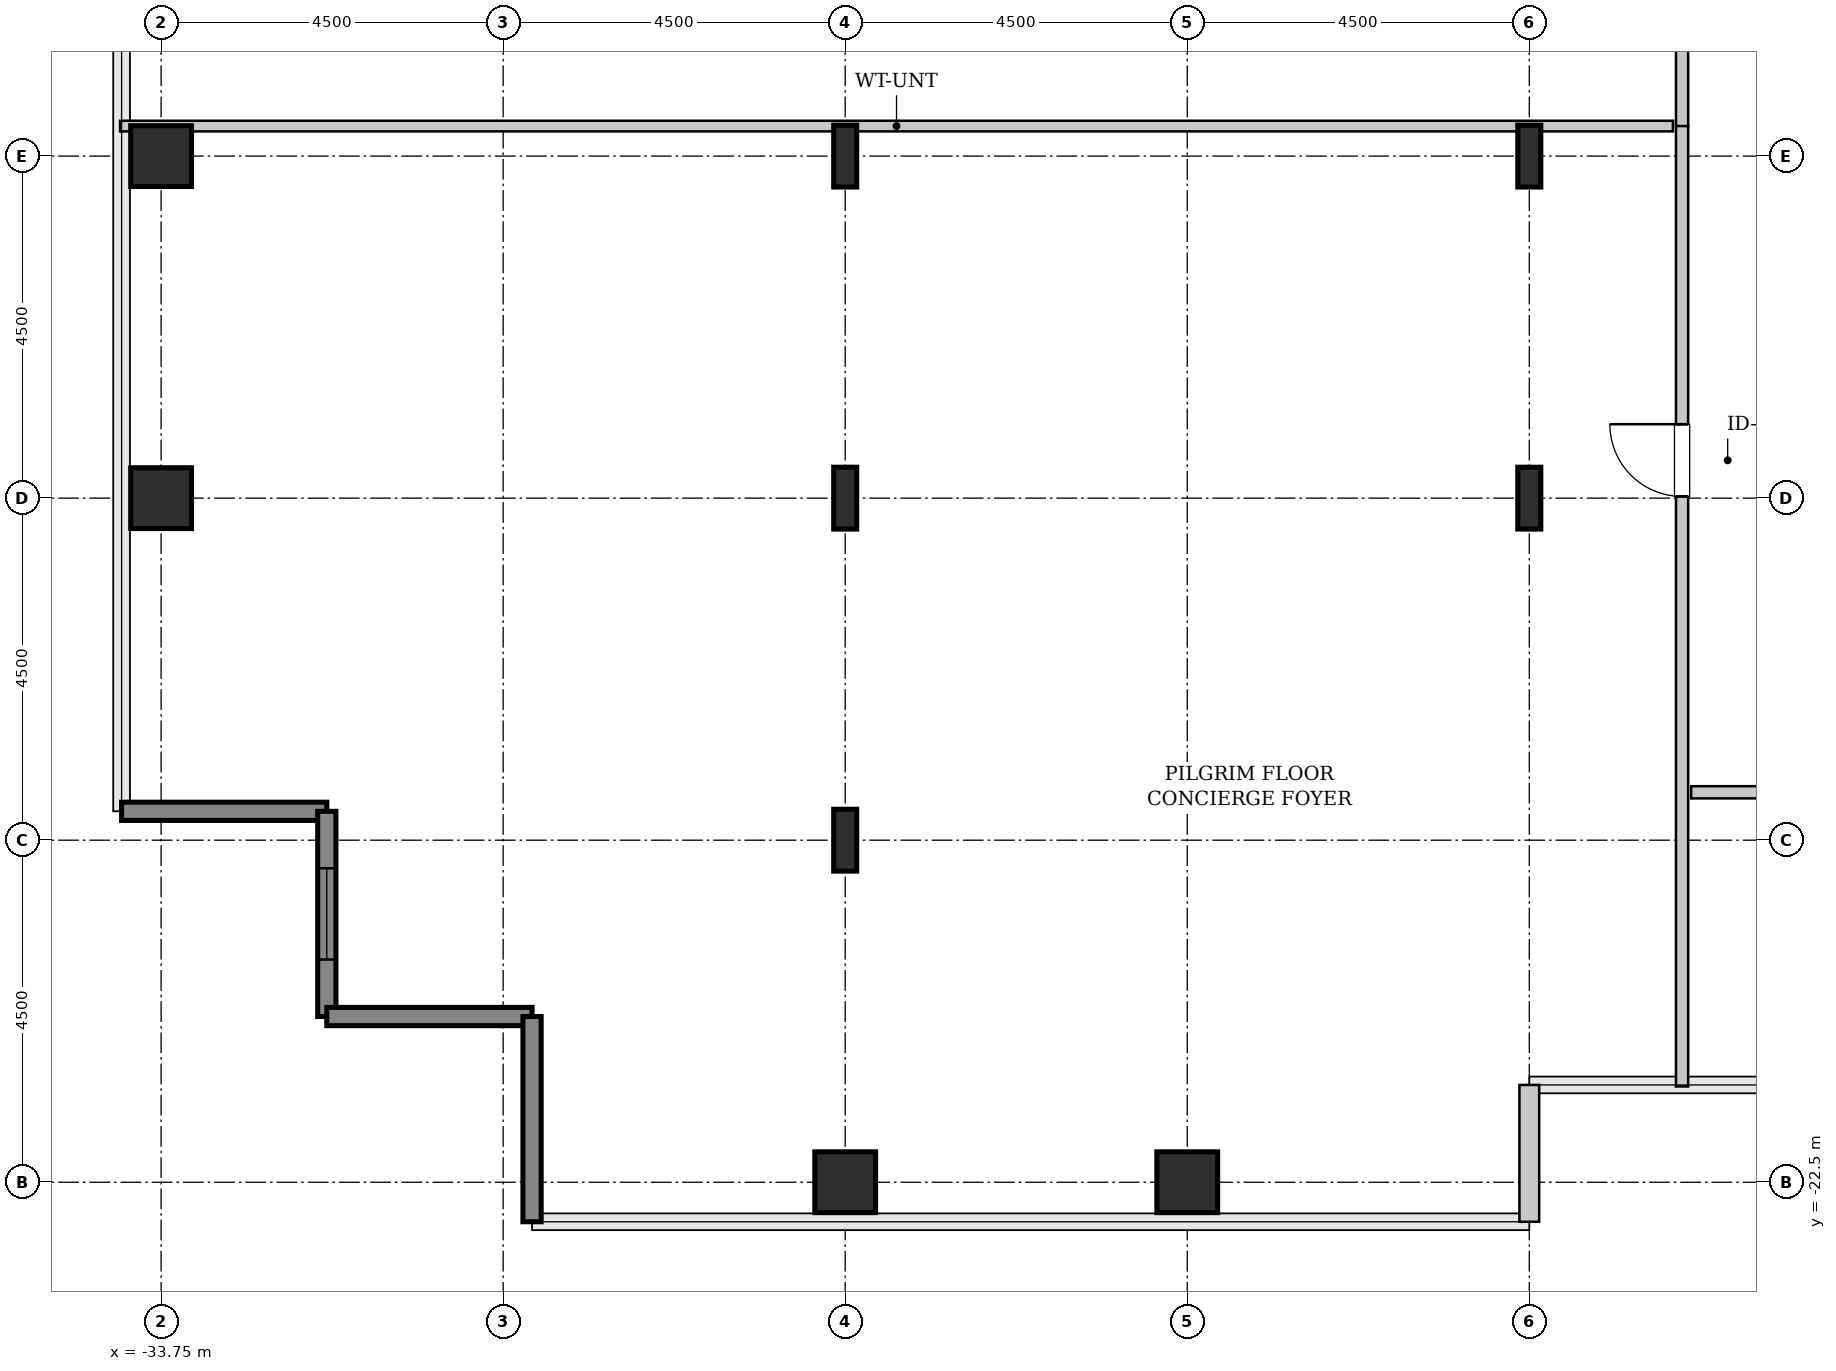
"""IFC4 building model, lengths in metres.
Left out: names, types, materials, properties, quantities, classifications, styles, units other than length and angle.
Written with IfcOpenShell. Run it as: python <this file> out.ifc"""

import sys

from ifc_helpers import new_model, si_unit, direction, frame, frame_2d, origin, origin_2d, place, context, subcontext, project, spatial, rectangle, hollow_rectangle, i_section, extrude, source, transform, mapped, element, fill, save


model = new_model("IFC4")
c1 = context("Model", 3, precision=1e-05, world=origin(), true_north=direction((0.0, 1.0)))
c2 = subcontext(c1, "Body", "Model", "MODEL_VIEW")
j1 = project(units=[si_unit("LENGTHUNIT", "METRE"), si_unit("PLANEANGLEUNIT", "RADIAN")], contexts=[c1])
p1 = place(None, origin())
s1 = spatial("IfcSite", under=j1, at=p1, CompositionType="ELEMENT")
p2 = place(p1, origin())
s2 = spatial("IfcBuilding", under=s1, at=p2, CompositionType="ELEMENT")
p3 = place(p2, frame((0.0, 0.0, 190.6)))
s3 = spatial("IfcBuildingStorey", under=s2, at=p3, CompositionType="ELEMENT", Elevation=190.6)
m1 = source(origin(), c2, "Body", "SweptSolid", [
    extrude(hollow_rectangle(XDim=0.8, YDim=0.8, WallThickness=0.04, InnerFilletRadius=0.04, OuterFilletRadius=0.08, at=origin_2d()), origin(), (0.0, 0.0, 1.0), 3.8),
])
for number, where, z_axis, x_axis in (
    (1, (-33.75, -13.5, 0.0), (0.0, 0.0, 1.0), (1.0, 0.0, 0.0)),
    (2, (-33.75, -9.0, 0.0), (0.0, 0.0, 1.0), (1.0, 0.0, 0.0)),
    (3, (-24.75, -22.5, 0.0), (0.0, 0.0, 1.0), (1.0, 0.0, 0.0)),
):
    element("IfcColumn", number, at=place(p3, frame(where, z_axis=z_axis, x_axis=x_axis)), inside=s3, PredefinedType="COLUMN", context=c2, shape_type="MappedRepresentation", body=[
        mapped(m1, transform((0.0, 0.0, 0.0), x_axis=(1.0, 0.0, 0.0), y_axis=(0.0, 1.0, 0.0), z_axis=(0.0, 0.0, 1.0), scale=1.0)),
    ])
m2 = source(origin(), c2, "Body", "SweptSolid", [
    extrude(i_section(OverallWidth=0.303, OverallDepth=0.814, WebThickness=0.021, FlangeThickness=0.04, FilletRadius=0.03, at=origin_2d()), origin(), (0.0, 0.0, 1.0), 3.8),
])
for number, where, z_axis, x_axis in (
    (4, (-24.75, -18.0, 0.0), (0.0, 0.0, 1.0), (1.0, 0.0, 0.0)),
    (5, (-24.75, -13.5, 0.0), (0.0, 0.0, 1.0), (1.0, 0.0, 0.0)),
    (6, (-24.75, -9.0, 0.0), (0.0, 0.0, 1.0), (1.0, 0.0, 0.0)),
):
    element("IfcColumn", number, at=place(p3, frame(where, z_axis=z_axis, x_axis=x_axis)), inside=s3, PredefinedType="COLUMN", context=c2, shape_type="MappedRepresentation", body=[
        mapped(m2, transform((0.0, 0.0, 0.0), x_axis=(1.0, 0.0, 0.0), y_axis=(0.0, 1.0, 0.0), z_axis=(0.0, 0.0, 1.0), scale=1.0)),
    ])
p4 = place(p3, frame((-20.25, -22.5, 0.0), z_axis=(0.0, 0.0, 1.0), x_axis=(1.0, 0.0, 0.0)))
e7 = element("IfcColumn", 7, at=p4, inside=s3, PredefinedType="COLUMN", context=c2, shape_type="MappedRepresentation", body=[
    mapped(m1, transform((0.0, 0.0, 0.0), x_axis=(1.0, 0.0, 0.0), y_axis=(0.0, 1.0, 0.0), z_axis=(0.0, 0.0, 1.0), scale=1.0)),
])
for number, where, z_axis, x_axis in (
    (8, (-15.75, -13.5, 0.0), (0.0, 0.0, 1.0), (1.0, 0.0, 0.0)),
    (9, (-15.75, -9.0, 0.0), (0.0, 0.0, 1.0), (1.0, 0.0, 0.0)),
):
    element("IfcColumn", number, at=place(p3, frame(where, z_axis=z_axis, x_axis=x_axis)), inside=s3, PredefinedType="COLUMN", context=c2, shape_type="MappedRepresentation", body=[
        mapped(m2, transform((0.0, 0.0, 0.0), x_axis=(1.0, 0.0, 0.0), y_axis=(0.0, 1.0, 0.0), z_axis=(0.0, 0.0, 1.0), scale=1.0)),
    ])
m3 = source(origin(), c2, "Body", "SweptSolid", [
    extrude(rectangle(XDim=2.7, YDim=0.24, at=frame_2d((1.35, 0.0))), origin(), (0.0, 0.0, 1.0), 3.55),
])
p5 = place(p3, frame((-34.27, -17.62, 0.0), z_axis=(0.0, 0.0, 1.0), x_axis=(1.0, 0.0, 0.0)))
e10 = element("IfcWall", 10, at=p5, inside=s3, PredefinedType="SHEAR", context=c2, shape_type="MappedRepresentation", body=[
    mapped(m3, transform((0.0, 0.0, 0.0), x_axis=(1.0, 0.0, 0.0), y_axis=(0.0, 1.0, 0.0), z_axis=(0.0, 0.0, 1.0), scale=1.0)),
])
p6 = place(p3, frame((-31.57, -17.62, 0.0), z_axis=(0.0, 0.0, 1.0), x_axis=(0.0, -1.0, 0.0)))
e11 = element("IfcWall", 11, at=p6, inside=s3, PredefinedType="SHEAR", context=c2, shape_type="MappedRepresentation", body=[
    mapped(m3, transform((0.0, 0.0, 0.0), x_axis=(1.0, 0.0, 0.0), y_axis=(0.0, 1.0, 0.0), z_axis=(0.0, 0.0, 1.0), scale=1.0)),
])
p7 = place(p6, frame((0.75, 0.0, 0.85)))
e12 = element("IfcOpeningElement", 12, at=p7, cuts=e11, PredefinedType="OPENING", context=c2, shape_type="SweptSolid", body=[
    extrude(rectangle(XDim=1.2, YDim=1.8, at=frame_2d((0.6, 0.9))), frame((0.0, 0.13, 0.0), z_axis=(0.0, -1.0, 0.0), x_axis=(1.0, 0.0, 0.0)), (0.0, 0.0, 1.0), 0.26),
])
for number, where, z_axis, x_axis in (
    (13, (-31.57, -20.32, 0.0), (0.0, 0.0, 1.0), (1.0, 0.0, 0.0)),
    (14, (-28.87, -20.32, 0.0), (0.0, 0.0, 1.0), (0.0, -1.0, 0.0)),
):
    element("IfcWall", number, at=place(p3, frame(where, z_axis=z_axis, x_axis=x_axis)), inside=s3, PredefinedType="SHEAR", context=c2, shape_type="MappedRepresentation", body=[
        mapped(m3, transform((0.0, 0.0, 0.0), x_axis=(1.0, 0.0, 0.0), y_axis=(0.0, 1.0, 0.0), z_axis=(0.0, 0.0, 1.0), scale=1.0)),
    ])
m4 = source(origin(), c2, "Body", "SweptSolid", [
    extrude(rectangle(XDim=1.8, YDim=0.26, at=frame_2d((0.9, 0.0))), origin(), (0.0, 0.0, 1.0), 3.55),
])
p8 = place(p3, frame((-15.75, -23.02, 0.0), z_axis=(0.0, 0.0, 1.0), x_axis=(0.0, 1.0, 0.0)))
e15 = element("IfcWall", 15, at=p8, inside=s3, PredefinedType="SOLIDWALL", context=c2, shape_type="MappedRepresentation", body=[
    mapped(m4, transform((0.0, 0.0, 0.0), x_axis=(1.0, 0.0, 0.0), y_axis=(0.0, 1.0, 0.0), z_axis=(0.0, 0.0, 1.0), scale=1.0)),
])
m5 = source(origin(), c2, "Body", "SweptSolid", [
    extrude(rectangle(XDim=12.645, YDim=0.16, at=frame_2d((6.323, 0.0))), origin(), (0.0, 0.0, 1.0), 3.535),
])
p9 = place(p3, frame((-13.74, -21.24, 0.0), z_axis=(0.0, 0.0, 1.0), x_axis=(0.0, 1.0, 0.0)))
e16 = element("IfcWall", 16, at=p9, inside=s3, PredefinedType="PARTITIONING", context=c2, shape_type="MappedRepresentation", body=[
    mapped(m5, transform((0.0, 0.0, 0.0), x_axis=(1.0, 0.0, 0.0), y_axis=(0.0, 1.0, 0.0), z_axis=(0.0, 0.0, 1.0), scale=1.0)),
])
p10 = place(p9, frame((7.762, 0.0, 0.0)))
e17 = element("IfcOpeningElement", 17, at=p10, cuts=e16, PredefinedType="OPENING", context=c2, shape_type="SweptSolid", body=[
    extrude(rectangle(XDim=0.95, YDim=2.1, at=frame_2d((0.475, 1.05))), frame((0.0, 0.09, 0.0), z_axis=(0.0, -1.0, 0.0), x_axis=(1.0, 0.0, 0.0)), (0.0, 0.0, 1.0), 0.18),
])
m6 = source(origin(), c2, "Body", "SweptSolid", [
    extrude(rectangle(XDim=20.43, YDim=0.14, at=frame_2d((10.215, 0.0))), origin(), (0.0, 0.0, 1.0), 2.875),
])
p11 = place(p3, frame((-34.29, -8.605, 0.0), z_axis=(0.0, 0.0, 1.0), x_axis=(1.0, 0.0, 0.0)))
e18 = element("IfcWall", 18, at=p11, inside=s3, PredefinedType="PARTITIONING", context=c2, shape_type="MappedRepresentation", body=[
    mapped(m6, transform((0.0, 0.0, 0.0), x_axis=(1.0, 0.0, 0.0), y_axis=(0.0, 1.0, 0.0), z_axis=(0.0, 0.0, 1.0), scale=1.0)),
])
m7 = source(origin(), c2, "Body", "SweptSolid", [
    extrude(rectangle(XDim=3.21, YDim=0.16, at=frame_2d((1.605, 0.0))), origin(), (0.0, 0.0, 1.0), 3.535),
])
p12 = place(p3, frame((-13.74, -8.605, 0.0), z_axis=(0.0, 0.0, 1.0), x_axis=(0.0, 1.0, 0.0)))
e19 = element("IfcWall", 19, at=p12, inside=s3, PredefinedType="PARTITIONING", context=c2, shape_type="MappedRepresentation", body=[
    mapped(m7, transform((0.0, 0.0, 0.0), x_axis=(1.0, 0.0, 0.0), y_axis=(0.0, 1.0, 0.0), z_axis=(0.0, 0.0, 1.0), scale=1.0)),
])
p13 = place(p12, frame((1.13, 0.0, 0.0)))
e20 = element("IfcOpeningElement", 20, at=p13, cuts=e19, PredefinedType="OPENING", context=c2, shape_type="SweptSolid", body=[
    extrude(rectangle(XDim=0.95, YDim=2.1, at=frame_2d((0.475, 1.05))), frame((0.0, 0.09, 0.0), z_axis=(0.0, -1.0, 0.0), x_axis=(1.0, 0.0, 0.0)), (0.0, 0.0, 1.0), 0.18),
])
m8 = source(origin(), c2, "Body", "SweptSolid", [
    extrude(rectangle(XDim=7.225, YDim=0.16, at=frame_2d((3.613, 0.0))), origin(), (0.0, 0.0, 1.0), 3.535),
])
p14 = place(p3, frame((-13.62, -17.37, 0.0), z_axis=(0.0, 0.0, 1.0), x_axis=(1.0, 0.0, 0.0)))
e21 = element("IfcWall", 21, at=p14, inside=s3, PredefinedType="PARTITIONING", context=c2, shape_type="MappedRepresentation", body=[
    mapped(m8, transform((0.0, 0.0, 0.0), x_axis=(1.0, 0.0, 0.0), y_axis=(0.0, 1.0, 0.0), z_axis=(0.0, 0.0, 1.0), scale=1.0)),
])
p15 = place(p14, frame((3.137, 0.0, 0.0)))
e22 = element("IfcOpeningElement", 22, at=p15, cuts=e21, PredefinedType="OPENING", context=c2, shape_type="SweptSolid", body=[
    extrude(rectangle(XDim=0.95, YDim=2.1, at=frame_2d((0.475, 1.05))), frame((0.0, 0.09, 0.0), z_axis=(0.0, -1.0, 0.0), x_axis=(1.0, 0.0, 0.0)), (0.0, 0.0, 1.0), 0.18),
])
m9 = source(origin(), c2, "Body", "SweptSolid", [
    extrude(rectangle(XDim=1.2, YDim=1.8, at=frame_2d((0.6, 0.9))), frame((0.0, 0.03, 0.0), z_axis=(0.0, -1.0, 0.0), x_axis=(1.0, 0.0, 0.0)), (0.0, 0.0, 1.0), 0.06),
])
p16 = place(p7, origin())
e23 = element("IfcWindow", 23, at=p16, inside=s3, PartitioningType="SINGLE_PANEL", PredefinedType="WINDOW", context=c2, shape_type="MappedRepresentation", body=[
    mapped(m9, transform((0.0, 0.0, 0.0), x_axis=(1.0, 0.0, 0.0), y_axis=(0.0, 1.0, 0.0), z_axis=(0.0, 0.0, 1.0), scale=1.0)),
])
fill(e12, e23)
m10 = source(origin(), c2, "Body", "SweptSolid", [
    extrude(rectangle(XDim=0.95, YDim=2.1, at=frame_2d((0.475, 1.05))), frame((0.0, 0.025, 0.0), z_axis=(0.0, -1.0, 0.0), x_axis=(1.0, 0.0, 0.0)), (0.0, 0.0, 1.0), 0.05),
])
p17 = place(p10, origin())
e24 = element("IfcDoor", 24, at=p17, inside=s3, OperationType="SINGLE_SWING_RIGHT", PredefinedType="DOOR", context=c2, shape_type="MappedRepresentation", body=[
    mapped(m10, transform((0.0, 0.0, 0.0), x_axis=(1.0, 0.0, 0.0), y_axis=(0.0, 1.0, 0.0), z_axis=(0.0, 0.0, 1.0), scale=1.0)),
])
fill(e17, e24)
save(model, sys.argv[1])
